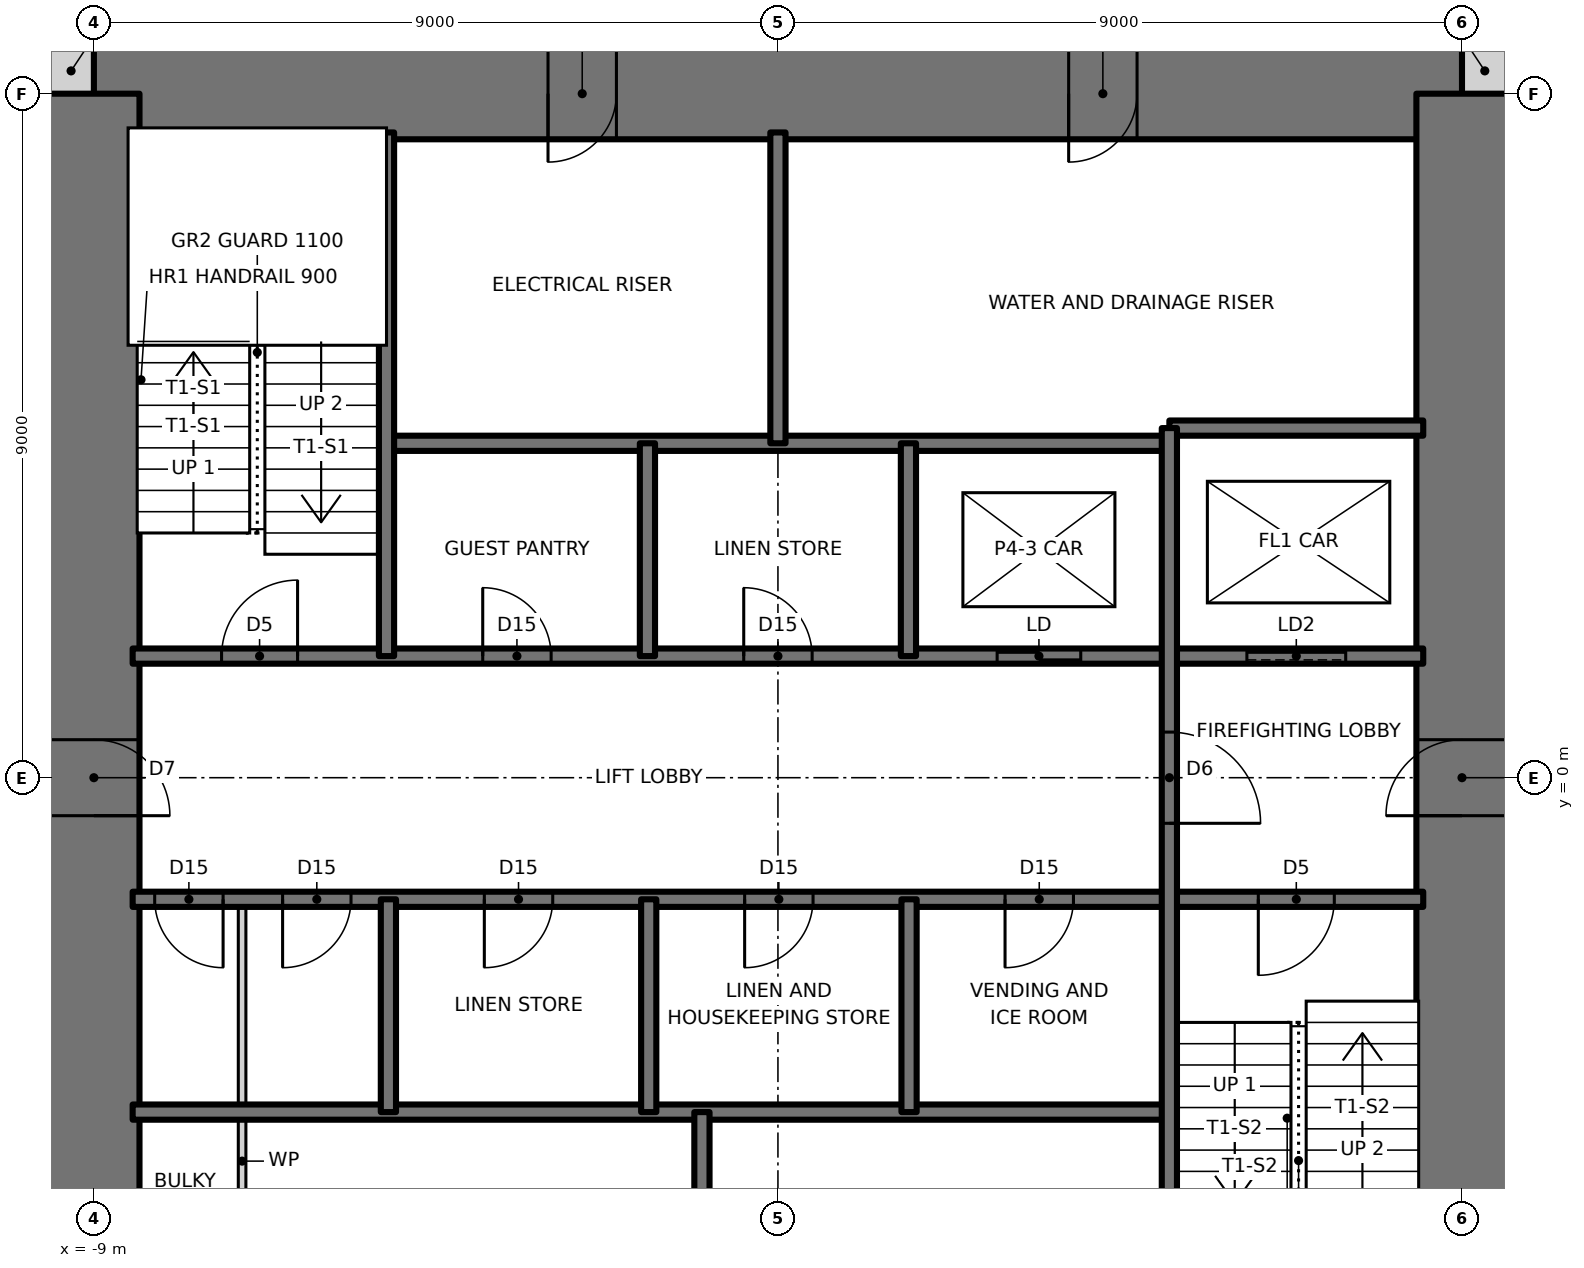
"""IFC4 building model, lengths in metres.
Left out: names, types, materials, properties, quantities, classifications, styles, units other than length and angle.
Written with IfcOpenShell. Run it as: python <this file> out.ifc"""

import sys

from ifc_helpers import new_model, si_unit, direction, frame, frame_2d, origin, place, context, subcontext, project, spatial, rectangle, extrude, element, fill, save


model = new_model("IFC4")
c1 = context("Model", 3, precision=1e-05, world=origin(), true_north=direction((0.0, 1.0)))
c2 = subcontext(c1, "Body", "Model", "MODEL_VIEW")
j1 = project(units=[si_unit("LENGTHUNIT", "METRE"), si_unit("PLANEANGLEUNIT", "RADIAN")], contexts=[c1])
p1 = place(None, origin())
s1 = spatial("IfcSite", under=j1, at=p1, CompositionType="ELEMENT")
p2 = place(p1, origin())
s2 = spatial("IfcBuilding", under=s1, at=p2, CompositionType="ELEMENT")
p3 = place(p2, frame((0.0, 0.0, 218.5)))
s3 = spatial("IfcBuildingStorey", under=s2, at=p3, CompositionType="ELEMENT", Elevation=218.5)
for number, where, z_axis, x_axis in (
    (1, (9.0, 9.3, 0.0), (0.0, 0.0, 1.0), (1.0, 0.0, 0.0)),
    (2, (-9.6, 9.3, 0.0), (0.0, 0.0, 1.0), (1.0, 0.0, 0.0)),
):
    element("IfcWall", number, at=place(p3, frame(where, z_axis=z_axis, x_axis=x_axis)), inside=s3, PredefinedType="SOLIDWALL", context=c2, shape_type="SweptSolid", body=[
        extrude(rectangle(XDim=0.6, YDim=0.6, at=frame_2d((0.3, 0.0))), origin(), (0.0, 0.0, 1.0), 3.5),
    ])
p4 = place(p3, frame((9.0, 9.0, 0.0), z_axis=(0.0, 0.0, 1.0), x_axis=(-1.0, 0.0, 0.0)))
e3 = element("IfcWall", 3, at=p4, inside=s3, PredefinedType="SHEAR", context=c2, shape_type="SweptSolid", body=[
    extrude(rectangle(XDim=18.0, YDim=1.2, at=frame_2d((9.0, 0.0))), origin(), (0.0, 0.0, 1.0), 3.5),
])
p5 = place(p4, frame((11.125, 0.0, 0.0)))
e4 = element("IfcOpeningElement", 4, at=p5, cuts=e3, PredefinedType="OPENING", context=c2, shape_type="SweptSolid", body=[
    extrude(rectangle(XDim=0.9, YDim=2.1, at=frame_2d((0.45, 1.05))), frame((0.0, 0.61, 0.0), z_axis=(0.0, -1.0, 0.0), x_axis=(1.0, 0.0, 0.0)), (0.0, 0.0, 1.0), 1.22),
])
p6 = place(p4, frame((4.275, 0.0, 0.0)))
e5 = element("IfcOpeningElement", 5, at=p6, cuts=e3, PredefinedType="OPENING", context=c2, shape_type="SweptSolid", body=[
    extrude(rectangle(XDim=0.9, YDim=2.1, at=frame_2d((0.45, 1.05))), frame((0.0, 0.61, 0.0), z_axis=(0.0, -1.0, 0.0), x_axis=(1.0, 0.0, 0.0)), (0.0, 0.0, 1.0), 1.22),
])
p7 = place(p3, frame((9.0, -9.0, 0.0), z_axis=(0.0, 0.0, 1.0), x_axis=(0.0, 1.0, 0.0)))
e6 = element("IfcWall", 6, at=p7, inside=s3, PredefinedType="SHEAR", context=c2, shape_type="SweptSolid", body=[
    extrude(rectangle(XDim=18.0, YDim=1.2, at=frame_2d((9.0, 0.0))), origin(), (0.0, 0.0, 1.0), 3.5),
])
p8 = place(p7, frame((8.5, 0.0, 0.0)))
e7 = element("IfcOpeningElement", 7, at=p8, cuts=e6, PredefinedType="OPENING", context=c2, shape_type="SweptSolid", body=[
    extrude(rectangle(XDim=1.0, YDim=2.1, at=frame_2d((0.5, 1.05))), frame((0.0, 0.61, 0.0), z_axis=(0.0, -1.0, 0.0), x_axis=(1.0, 0.0, 0.0)), (0.0, 0.0, 1.0), 1.22),
])
p9 = place(p3, frame((-9.0, 9.0, 0.0), z_axis=(0.0, 0.0, 1.0), x_axis=(0.0, -1.0, 0.0)))
e8 = element("IfcWall", 8, at=p9, inside=s3, PredefinedType="SHEAR", context=c2, shape_type="SweptSolid", body=[
    extrude(rectangle(XDim=18.0, YDim=1.2, at=frame_2d((9.0, 0.0))), origin(), (0.0, 0.0, 1.0), 3.5),
])
p10 = place(p9, frame((8.5, 0.0, 0.0)))
e9 = element("IfcOpeningElement", 9, at=p10, cuts=e8, PredefinedType="OPENING", context=c2, shape_type="SweptSolid", body=[
    extrude(rectangle(XDim=1.0, YDim=2.1, at=frame_2d((0.5, 1.05))), frame((0.0, 0.61, 0.0), z_axis=(0.0, -1.0, 0.0), x_axis=(1.0, 0.0, 0.0)), (0.0, 0.0, 1.0), 1.22),
])
p11 = place(p3, frame((-8.49, -4.4, 0.0), z_axis=(0.0, 0.0, 1.0), x_axis=(1.0, 0.0, 0.0)))
e10 = element("IfcWall", 10, at=p11, inside=s3, PredefinedType="SOLIDWALL", context=c2, shape_type="SweptSolid", body=[
    extrude(rectangle(XDim=13.64, YDim=0.2, at=frame_2d((6.82, 0.0))), origin(), (0.0, 0.0, 1.0), 3.5),
])
p12 = place(p3, frame((-8.49, -1.6, 0.0), z_axis=(0.0, 0.0, 1.0), x_axis=(1.0, 0.0, 0.0)))
e11 = element("IfcWall", 11, at=p12, inside=s3, PredefinedType="SOLIDWALL", context=c2, shape_type="SweptSolid", body=[
    extrude(rectangle(XDim=16.98, YDim=0.2, at=frame_2d((8.49, 0.0))), origin(), (0.0, 0.0, 1.0), 3.5),
])
p13 = place(p12, frame((14.81, 0.0, 0.0)))
e12 = element("IfcOpeningElement", 12, at=p13, cuts=e11, PredefinedType="OPENING", context=c2, shape_type="SweptSolid", body=[
    extrude(rectangle(XDim=1.0, YDim=2.1, at=frame_2d((0.5, 1.05))), frame((0.0, 0.11, 0.0), z_axis=(0.0, -1.0, 0.0), x_axis=(1.0, 0.0, 0.0)), (0.0, 0.0, 1.0), 0.22),
])
p14 = place(p12, frame((1.973, 0.0, 0.0)))
e13 = element("IfcOpeningElement", 13, at=p14, cuts=e11, PredefinedType="OPENING", context=c2, shape_type="SweptSolid", body=[
    extrude(rectangle(XDim=0.9, YDim=2.1, at=frame_2d((0.45, 1.05))), frame((0.0, 0.11, 0.0), z_axis=(0.0, -1.0, 0.0), x_axis=(1.0, 0.0, 0.0)), (0.0, 0.0, 1.0), 0.22),
])
p15 = place(p12, frame((0.29, 0.0, 0.0)))
e14 = element("IfcOpeningElement", 14, at=p15, cuts=e11, PredefinedType="OPENING", context=c2, shape_type="SweptSolid", body=[
    extrude(rectangle(XDim=0.9, YDim=2.1, at=frame_2d((0.45, 1.05))), frame((0.0, 0.11, 0.0), z_axis=(0.0, -1.0, 0.0), x_axis=(1.0, 0.0, 0.0)), (0.0, 0.0, 1.0), 0.22),
])
p16 = place(p12, frame((4.627, 0.0, 0.0)))
e15 = element("IfcOpeningElement", 15, at=p16, cuts=e11, PredefinedType="OPENING", context=c2, shape_type="SweptSolid", body=[
    extrude(rectangle(XDim=0.9, YDim=2.1, at=frame_2d((0.45, 1.05))), frame((0.0, 0.11, 0.0), z_axis=(0.0, -1.0, 0.0), x_axis=(1.0, 0.0, 0.0)), (0.0, 0.0, 1.0), 0.22),
])
p17 = place(p12, frame((8.052, 0.0, 0.0)))
e16 = element("IfcOpeningElement", 16, at=p17, cuts=e11, PredefinedType="OPENING", context=c2, shape_type="SweptSolid", body=[
    extrude(rectangle(XDim=0.9, YDim=2.1, at=frame_2d((0.45, 1.05))), frame((0.0, 0.11, 0.0), z_axis=(0.0, -1.0, 0.0), x_axis=(1.0, 0.0, 0.0)), (0.0, 0.0, 1.0), 0.22),
])
p18 = place(p12, frame((11.478, 0.0, 0.0)))
e17 = element("IfcOpeningElement", 17, at=p18, cuts=e11, PredefinedType="OPENING", context=c2, shape_type="SweptSolid", body=[
    extrude(rectangle(XDim=0.9, YDim=2.1, at=frame_2d((0.45, 1.05))), frame((0.0, 0.11, 0.0), z_axis=(0.0, -1.0, 0.0), x_axis=(1.0, 0.0, 0.0)), (0.0, 0.0, 1.0), 0.22),
])
p19 = place(p3, frame((-8.49, 1.6, 0.0), z_axis=(0.0, 0.0, 1.0), x_axis=(1.0, 0.0, 0.0)))
e18 = element("IfcWall", 18, at=p19, inside=s3, PredefinedType="SOLIDWALL", context=c2, shape_type="SweptSolid", body=[
    extrude(rectangle(XDim=16.98, YDim=0.2, at=frame_2d((8.49, 0.0))), origin(), (0.0, 0.0, 1.0), 3.5),
])
p20 = place(p19, frame((1.17, 0.0, 0.0)))
e19 = element("IfcOpeningElement", 19, at=p20, cuts=e18, PredefinedType="OPENING", context=c2, shape_type="SweptSolid", body=[
    extrude(rectangle(XDim=1.0, YDim=2.1, at=frame_2d((0.5, 1.05))), frame((0.0, 0.11, 0.0), z_axis=(0.0, -1.0, 0.0), x_axis=(1.0, 0.0, 0.0)), (0.0, 0.0, 1.0), 0.22),
])
p21 = place(p19, frame((4.606, 0.0, 0.0)))
e20 = element("IfcOpeningElement", 20, at=p21, cuts=e18, PredefinedType="OPENING", context=c2, shape_type="SweptSolid", body=[
    extrude(rectangle(XDim=0.9, YDim=2.1, at=frame_2d((0.45, 1.05))), frame((0.0, 0.11, 0.0), z_axis=(0.0, -1.0, 0.0), x_axis=(1.0, 0.0, 0.0)), (0.0, 0.0, 1.0), 0.22),
])
p22 = place(p19, frame((8.04, 0.0, 0.0)))
e21 = element("IfcOpeningElement", 21, at=p22, cuts=e18, PredefinedType="OPENING", context=c2, shape_type="SweptSolid", body=[
    extrude(rectangle(XDim=0.9, YDim=2.1, at=frame_2d((0.45, 1.05))), frame((0.0, 0.11, 0.0), z_axis=(0.0, -1.0, 0.0), x_axis=(1.0, 0.0, 0.0)), (0.0, 0.0, 1.0), 0.22),
])
p23 = place(p19, frame((11.374, 0.0, 0.0)))
e22 = element("IfcOpeningElement", 22, at=p23, cuts=e18, PredefinedType="OPENING", context=c2, shape_type="SweptSolid", body=[
    extrude(rectangle(XDim=1.1, YDim=2.1, at=frame_2d((0.55, 1.05))), frame((0.0, 0.11, 0.0), z_axis=(0.0, -1.0, 0.0), x_axis=(1.0, 0.0, 0.0)), (0.0, 0.0, 1.0), 0.22),
])
p24 = place(p19, frame((14.66, 0.0, 0.0)))
e23 = element("IfcOpeningElement", 23, at=p24, cuts=e18, PredefinedType="OPENING", context=c2, shape_type="SweptSolid", body=[
    extrude(rectangle(XDim=1.3, YDim=2.1, at=frame_2d((0.65, 1.05))), frame((0.0, 0.11, 0.0), z_axis=(0.0, -1.0, 0.0), x_axis=(1.0, 0.0, 0.0)), (0.0, 0.0, 1.0), 0.22),
])
p25 = place(p3, frame((-5.15, 4.4, 0.0), z_axis=(0.0, 0.0, 1.0), x_axis=(1.0, 0.0, 0.0)))
e24 = element("IfcWall", 24, at=p25, inside=s3, PredefinedType="SOLIDWALL", context=c2, shape_type="SweptSolid", body=[
    extrude(rectangle(XDim=10.3, YDim=0.2, at=frame_2d((5.15, 0.0))), origin(), (0.0, 0.0, 1.0), 3.5),
])
p26 = place(p3, frame((5.15, 4.6, 0.0), z_axis=(0.0, 0.0, 1.0), x_axis=(1.0, 0.0, 0.0)))
e25 = element("IfcWall", 25, at=p26, inside=s3, PredefinedType="SOLIDWALL", context=c2, shape_type="SweptSolid", body=[
    extrude(rectangle(XDim=3.34, YDim=0.2, at=frame_2d((1.67, 0.0))), origin(), (0.0, 0.0, 1.0), 3.5),
])
p27 = place(p3, frame((5.15, -8.49, 0.0), z_axis=(0.0, 0.0, 1.0), x_axis=(0.0, 1.0, 0.0)))
e26 = element("IfcWall", 26, at=p27, inside=s3, PredefinedType="SOLIDWALL", context=c2, shape_type="SweptSolid", body=[
    extrude(rectangle(XDim=13.09, YDim=0.2, at=frame_2d((6.545, 0.0))), origin(), (0.0, 0.0, 1.0), 3.5),
])
p28 = place(p27, frame((7.89, 0.0, 0.0)))
e27 = element("IfcOpeningElement", 27, at=p28, cuts=e26, PredefinedType="OPENING", context=c2, shape_type="SweptSolid", body=[
    extrude(rectangle(XDim=1.2, YDim=2.1, at=frame_2d((0.6, 1.05))), frame((0.0, 0.11, 0.0), z_axis=(0.0, -1.0, 0.0), x_axis=(1.0, 0.0, 0.0)), (0.0, 0.0, 1.0), 0.22),
])
for number, where, z_axis, x_axis in (
    (28, (1.725, -4.4, 0.0), (0.0, 0.0, 1.0), (0.0, 1.0, 0.0)),
    (29, (1.717, 1.6, 0.0), (0.0, 0.0, 1.0), (0.0, 1.0, 0.0)),
):
    element("IfcWall", number, at=place(p3, frame(where, z_axis=z_axis, x_axis=x_axis)), inside=s3, PredefinedType="SOLIDWALL", context=c2, shape_type="SweptSolid", body=[
        extrude(rectangle(XDim=2.8, YDim=0.2, at=frame_2d((1.4, 0.0))), origin(), (0.0, 0.0, 1.0), 3.5),
    ])
for number, where, z_axis, x_axis in (
    (30, (0.0, 4.4, 0.0), (0.0, 0.0, 1.0), (0.0, 1.0, 0.0)),
    (31, (-1.0, -8.49, 0.0), (0.0, 0.0, 1.0), (0.0, 1.0, 0.0)),
):
    element("IfcWall", number, at=place(p3, frame(where, z_axis=z_axis, x_axis=x_axis)), inside=s3, PredefinedType="SOLIDWALL", context=c2, shape_type="SweptSolid", body=[
        extrude(rectangle(XDim=4.09, YDim=0.2, at=frame_2d((2.045, 0.0))), origin(), (0.0, 0.0, 1.0), 3.5),
    ])
for number, where, z_axis, x_axis in (
    (32, (-1.7, -4.4, 0.0), (0.0, 0.0, 1.0), (0.0, 1.0, 0.0)),
    (33, (-1.717, 1.6, 0.0), (0.0, 0.0, 1.0), (0.0, 1.0, 0.0)),
    (34, (-5.125, -4.4, 0.0), (0.0, 0.0, 1.0), (0.0, 1.0, 0.0)),
):
    element("IfcWall", number, at=place(p3, frame(where, z_axis=z_axis, x_axis=x_axis)), inside=s3, PredefinedType="SOLIDWALL", context=c2, shape_type="SweptSolid", body=[
        extrude(rectangle(XDim=2.8, YDim=0.2, at=frame_2d((1.4, 0.0))), origin(), (0.0, 0.0, 1.0), 3.5),
    ])
p29 = place(p3, frame((-5.15, 1.6, 0.0), z_axis=(0.0, 0.0, 1.0), x_axis=(0.0, 1.0, 0.0)))
e35 = element("IfcWall", 35, at=p29, inside=s3, PredefinedType="SOLIDWALL", context=c2, shape_type="SweptSolid", body=[
    extrude(rectangle(XDim=6.89, YDim=0.2, at=frame_2d((3.445, 0.0))), origin(), (0.0, 0.0, 1.0), 3.5),
])
p30 = place(p3, frame((-7.05, -8.49, 0.0), z_axis=(0.0, 0.0, 1.0), x_axis=(0.0, 1.0, 0.0)))
e36 = element("IfcWall", 36, at=p30, inside=s3, PredefinedType="PARTITIONING", context=c2, shape_type="SweptSolid", body=[
    extrude(rectangle(XDim=6.89, YDim=0.1, at=frame_2d((3.445, 0.0))), origin(), (0.0, 0.0, 1.0), 3.3),
])
p31 = place(p30, frame((1.595, 0.0, 0.0)))
e37 = element("IfcOpeningElement", 37, at=p31, cuts=e36, PredefinedType="OPENING", context=c2, shape_type="SweptSolid", body=[
    extrude(rectangle(XDim=0.9, YDim=2.1, at=frame_2d((0.45, 1.05))), frame((0.0, 0.06, 0.0), z_axis=(0.0, -1.0, 0.0), x_axis=(1.0, 0.0, 0.0)), (0.0, 0.0, 1.0), 0.12),
])
p32 = place(p20, origin())
e38 = element("IfcDoor", 38, at=p32, inside=s3, OperationType="SINGLE_SWING_RIGHT", PredefinedType="DOOR", context=c2, shape_type="SweptSolid", body=[
    extrude(rectangle(XDim=1.0, YDim=2.1, at=frame_2d((0.5, 1.05))), frame((0.0, 0.025, 0.0), z_axis=(0.0, -1.0, 0.0), x_axis=(1.0, 0.0, 0.0)), (0.0, 0.0, 1.0), 0.05),
])
fill(e19, e38)
p33 = place(p13, frame((1.0, 0.0, 0.0), z_axis=(0.0, 0.0, 1.0), x_axis=(-1.0, 0.0, 0.0)))
e39 = element("IfcDoor", 39, at=p33, inside=s3, OperationType="SINGLE_SWING_RIGHT", PredefinedType="DOOR", context=c2, shape_type="SweptSolid", body=[
    extrude(rectangle(XDim=1.0, YDim=2.1, at=frame_2d((0.5, 1.05))), frame((0.0, 0.025, 0.0), z_axis=(0.0, -1.0, 0.0), x_axis=(1.0, 0.0, 0.0)), (0.0, 0.0, 1.0), 0.05),
])
fill(e12, e39)
p34 = place(p28, frame((1.2, 0.0, 0.0), z_axis=(0.0, 0.0, 1.0), x_axis=(-1.0, 0.0, 0.0)))
e40 = element("IfcDoor", 40, at=p34, inside=s3, OperationType="SINGLE_SWING_RIGHT", PredefinedType="DOOR", context=c2, shape_type="SweptSolid", body=[
    extrude(rectangle(XDim=1.2, YDim=2.1, at=frame_2d((0.6, 1.05))), frame((0.0, 0.025, 0.0), z_axis=(0.0, -1.0, 0.0), x_axis=(1.0, 0.0, 0.0)), (0.0, 0.0, 1.0), 0.05),
])
fill(e27, e40)
p35 = place(p21, origin())
e41 = element("IfcDoor", 41, at=p35, inside=s3, OperationType="SINGLE_SWING_LEFT", PredefinedType="DOOR", context=c2, shape_type="SweptSolid", body=[
    extrude(rectangle(XDim=0.9, YDim=2.1, at=frame_2d((0.45, 1.05))), frame((0.0, 0.025, 0.0), z_axis=(0.0, -1.0, 0.0), x_axis=(1.0, 0.0, 0.0)), (0.0, 0.0, 1.0), 0.05),
])
fill(e20, e41)
p36 = place(p22, origin())
e42 = element("IfcDoor", 42, at=p36, inside=s3, OperationType="SINGLE_SWING_LEFT", PredefinedType="DOOR", context=c2, shape_type="SweptSolid", body=[
    extrude(rectangle(XDim=0.9, YDim=2.1, at=frame_2d((0.45, 1.05))), frame((0.0, 0.025, 0.0), z_axis=(0.0, -1.0, 0.0), x_axis=(1.0, 0.0, 0.0)), (0.0, 0.0, 1.0), 0.05),
])
fill(e21, e42)
p37 = place(p14, frame((0.9, 0.0, 0.0), z_axis=(0.0, 0.0, 1.0), x_axis=(-1.0, 0.0, 0.0)))
e43 = element("IfcDoor", 43, at=p37, inside=s3, OperationType="SINGLE_SWING_RIGHT", PredefinedType="DOOR", context=c2, shape_type="SweptSolid", body=[
    extrude(rectangle(XDim=0.9, YDim=2.1, at=frame_2d((0.45, 1.05))), frame((0.0, 0.025, 0.0), z_axis=(0.0, -1.0, 0.0), x_axis=(1.0, 0.0, 0.0)), (0.0, 0.0, 1.0), 0.05),
])
fill(e13, e43)
p38 = place(p15, frame((0.9, 0.0, 0.0), z_axis=(0.0, 0.0, 1.0), x_axis=(-1.0, 0.0, 0.0)))
e44 = element("IfcDoor", 44, at=p38, inside=s3, OperationType="SINGLE_SWING_LEFT", PredefinedType="DOOR", context=c2, shape_type="SweptSolid", body=[
    extrude(rectangle(XDim=0.9, YDim=2.1, at=frame_2d((0.45, 1.05))), frame((0.0, 0.025, 0.0), z_axis=(0.0, -1.0, 0.0), x_axis=(1.0, 0.0, 0.0)), (0.0, 0.0, 1.0), 0.05),
])
fill(e14, e44)
p39 = place(p16, frame((0.9, 0.0, 0.0), z_axis=(0.0, 0.0, 1.0), x_axis=(-1.0, 0.0, 0.0)))
e45 = element("IfcDoor", 45, at=p39, inside=s3, OperationType="SINGLE_SWING_RIGHT", PredefinedType="DOOR", context=c2, shape_type="SweptSolid", body=[
    extrude(rectangle(XDim=0.9, YDim=2.1, at=frame_2d((0.45, 1.05))), frame((0.0, 0.025, 0.0), z_axis=(0.0, -1.0, 0.0), x_axis=(1.0, 0.0, 0.0)), (0.0, 0.0, 1.0), 0.05),
])
fill(e15, e45)
p40 = place(p17, frame((0.9, 0.0, 0.0), z_axis=(0.0, 0.0, 1.0), x_axis=(-1.0, 0.0, 0.0)))
e46 = element("IfcDoor", 46, at=p40, inside=s3, OperationType="SINGLE_SWING_RIGHT", PredefinedType="DOOR", context=c2, shape_type="SweptSolid", body=[
    extrude(rectangle(XDim=0.9, YDim=2.1, at=frame_2d((0.45, 1.05))), frame((0.0, 0.025, 0.0), z_axis=(0.0, -1.0, 0.0), x_axis=(1.0, 0.0, 0.0)), (0.0, 0.0, 1.0), 0.05),
])
fill(e16, e46)
p41 = place(p18, frame((0.9, 0.0, 0.0), z_axis=(0.0, 0.0, 1.0), x_axis=(-1.0, 0.0, 0.0)))
e47 = element("IfcDoor", 47, at=p41, inside=s3, OperationType="SINGLE_SWING_RIGHT", PredefinedType="DOOR", context=c2, shape_type="SweptSolid", body=[
    extrude(rectangle(XDim=0.9, YDim=2.1, at=frame_2d((0.45, 1.05))), frame((0.0, 0.025, 0.0), z_axis=(0.0, -1.0, 0.0), x_axis=(1.0, 0.0, 0.0)), (0.0, 0.0, 1.0), 0.05),
])
fill(e17, e47)
p42 = place(p10, origin())
e48 = element("IfcDoor", 48, at=p42, inside=s3, OperationType="SINGLE_SWING_RIGHT", PredefinedType="DOOR", context=c2, shape_type="SweptSolid", body=[
    extrude(rectangle(XDim=1.0, YDim=2.1, at=frame_2d((0.5, 1.05))), frame((0.0, 0.025, 0.0), z_axis=(0.0, -1.0, 0.0), x_axis=(1.0, 0.0, 0.0)), (0.0, 0.0, 1.0), 0.05),
])
fill(e9, e48)
p43 = place(p8, origin())
e49 = element("IfcDoor", 49, at=p43, inside=s3, OperationType="SINGLE_SWING_LEFT", PredefinedType="DOOR", context=c2, shape_type="SweptSolid", body=[
    extrude(rectangle(XDim=1.0, YDim=2.1, at=frame_2d((0.5, 1.05))), frame((0.0, 0.025, 0.0), z_axis=(0.0, -1.0, 0.0), x_axis=(1.0, 0.0, 0.0)), (0.0, 0.0, 1.0), 0.05),
])
fill(e7, e49)
p44 = place(p5, origin())
e50 = element("IfcDoor", 50, at=p44, inside=s3, OperationType="SINGLE_SWING_RIGHT", PredefinedType="DOOR", context=c2, shape_type="SweptSolid", body=[
    extrude(rectangle(XDim=0.9, YDim=2.1, at=frame_2d((0.45, 1.05))), frame((0.0, 0.025, 0.0), z_axis=(0.0, -1.0, 0.0), x_axis=(1.0, 0.0, 0.0)), (0.0, 0.0, 1.0), 0.05),
])
fill(e4, e50)
p45 = place(p6, origin())
e51 = element("IfcDoor", 51, at=p45, inside=s3, OperationType="SINGLE_SWING_RIGHT", PredefinedType="DOOR", context=c2, shape_type="SweptSolid", body=[
    extrude(rectangle(XDim=0.9, YDim=2.1, at=frame_2d((0.45, 1.05))), frame((0.0, 0.025, 0.0), z_axis=(0.0, -1.0, 0.0), x_axis=(1.0, 0.0, 0.0)), (0.0, 0.0, 1.0), 0.05),
])
fill(e5, e51)
p46 = place(p23, origin())
e52 = element("IfcDoor", 52, at=p46, inside=s3, OperationType="DOUBLE_DOOR_SLIDING", PredefinedType="DOOR", context=c2, shape_type="SweptSolid", body=[
    extrude(rectangle(XDim=1.1, YDim=2.1, at=frame_2d((0.55, 1.05))), frame((0.0, 0.025, 0.0), z_axis=(0.0, -1.0, 0.0), x_axis=(1.0, 0.0, 0.0)), (0.0, 0.0, 1.0), 0.05),
])
fill(e22, e52)
p47 = place(p24, origin())
e53 = element("IfcDoor", 53, at=p47, inside=s3, OperationType="SLIDING_TO_LEFT", PredefinedType="DOOR", context=c2, shape_type="SweptSolid", body=[
    extrude(rectangle(XDim=1.3, YDim=2.1, at=frame_2d((0.65, 1.05))), frame((0.0, 0.025, 0.0), z_axis=(0.0, -1.0, 0.0), x_axis=(1.0, 0.0, 0.0)), (0.0, 0.0, 1.0), 0.05),
])
fill(e23, e53)
save(model, sys.argv[1])
